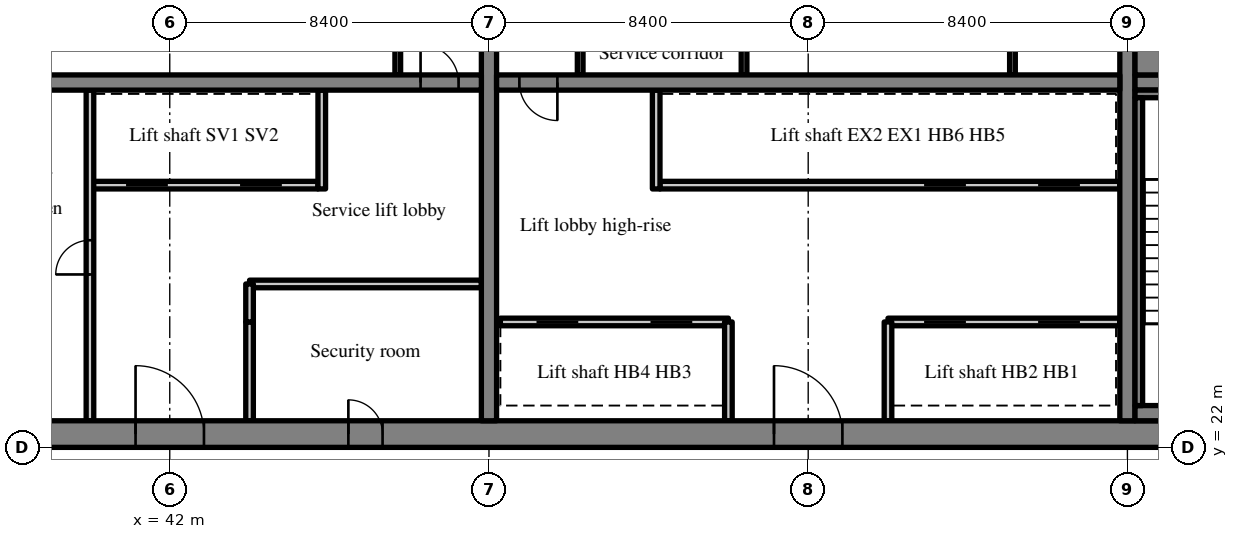
"""IFC4 building model, lengths in metres.
Left out: names, types, materials, properties, quantities, classifications, styles, units other than length and angle.
Written with IfcOpenShell. Run it as: python <this file> out.ifc"""

import sys

from ifc_helpers import new_model, si_unit, direction, frame, frame_2d, origin, place, context, subcontext, project, spatial, rectangle, extrude, source, transform, mapped, element, fill, save


model = new_model("IFC4")
c1 = context("Model", 3, precision=1e-05, world=origin(), true_north=direction((0.0, 1.0)))
c2 = subcontext(c1, "Body", "Model", "MODEL_VIEW")
j1 = project(units=[si_unit("LENGTHUNIT", "METRE"), si_unit("PLANEANGLEUNIT", "RADIAN")], contexts=[c1])
p1 = place(None, origin())
s1 = spatial("IfcSite", under=j1, at=p1, CompositionType="ELEMENT")
p2 = place(p1, origin())
s2 = spatial("IfcBuilding", under=s1, at=p2, CompositionType="ELEMENT")
p3 = place(p2, frame((0.0, 0.0, 170.6)))
s3 = spatial("IfcBuildingStorey", under=s2, at=p3, CompositionType="ELEMENT", Elevation=170.6)
m1 = source(origin(), c2, "Body", "SweptSolid", [
    extrude(rectangle(XDim=50.4, YDim=0.7, at=frame_2d((25.2, 0.0))), origin(), (0.0, 0.0, 1.0), 3.52),
])
p4 = place(p3, frame((25.2, 22.35, 0.0), z_axis=(0.0, 0.0, 1.0), x_axis=(1.0, 0.0, 0.0)))
e1 = element("IfcWall", 1, at=p4, inside=s3, PredefinedType="SHEAR", context=c2, shape_type="MappedRepresentation", body=[
    mapped(m1, transform((0.0, 0.0, 0.0), scale=1.0)),
])
m2 = source(origin(), c2, "Body", "SweptSolid", [
    extrude(rectangle(XDim=1.8, YDim=2.1, at=frame_2d((0.9, 1.05))), frame((0.0, 0.36, 0.0), z_axis=(0.0, -1.0, 0.0), x_axis=(1.0, 0.0, 0.0)), (0.0, 0.0, 1.0), 0.72),
])
p5 = place(p4, frame((15.9, 0.0, 0.0)))
e2 = element("IfcOpeningElement", 2, at=p5, cuts=e1, PredefinedType="OPENING", context=c2, shape_type="MappedRepresentation", body=[
    mapped(m2, transform((0.0, 0.0, 0.0), scale=1.0)),
])
m3 = source(origin(), c2, "Body", "SweptSolid", [
    extrude(rectangle(XDim=0.9, YDim=2.1, at=frame_2d((0.45, 1.05))), frame((0.0, 0.36, 0.0), z_axis=(0.0, -1.0, 0.0), x_axis=(1.0, 0.0, 0.0)), (0.0, 0.0, 1.0), 0.72),
])
p6 = place(p4, frame((9.7, 0.0, 0.0)))
e3 = element("IfcOpeningElement", 3, at=p6, cuts=e1, PredefinedType="OPENING", context=c2, shape_type="MappedRepresentation", body=[
    mapped(m3, transform((0.0, 0.0, 0.0), scale=1.0)),
])
p7 = place(p4, frame((21.5, 0.0, 0.0)))
e4 = element("IfcOpeningElement", 4, at=p7, cuts=e1, PredefinedType="OPENING", context=c2, shape_type="MappedRepresentation", body=[
    mapped(m3, transform((0.0, 0.0, 0.0), scale=1.0)),
])
p8 = place(p4, frame((32.7, 0.0, 0.0)))
e5 = element("IfcOpeningElement", 5, at=p8, cuts=e1, PredefinedType="OPENING", context=c2, shape_type="MappedRepresentation", body=[
    mapped(m2, transform((0.0, 0.0, 0.0), scale=1.0)),
])
m4 = source(origin(), c2, "Body", "SweptSolid", [
    extrude(rectangle(XDim=1.2, YDim=2.1, at=frame_2d((0.6, 1.05))), frame((0.0, 0.36, 0.0), z_axis=(0.0, -1.0, 0.0), x_axis=(1.0, 0.0, 0.0)), (0.0, 0.0, 1.0), 0.72),
])
p9 = place(p4, frame((6.475, 0.0, 0.0)))
e6 = element("IfcOpeningElement", 6, at=p9, cuts=e1, PredefinedType="OPENING", context=c2, shape_type="MappedRepresentation", body=[
    mapped(m4, transform((0.0, 0.0, 0.0), scale=1.0)),
])
p10 = place(p4, frame((47.875, 0.0, 0.0)))
e7 = element("IfcOpeningElement", 7, at=p10, cuts=e1, PredefinedType="OPENING", context=c2, shape_type="MappedRepresentation", body=[
    mapped(m4, transform((0.0, 0.0, 0.0), scale=1.0)),
])
m5 = source(origin(), c2, "Body", "SweptSolid", [
    extrude(rectangle(XDim=18.6, YDim=0.4, at=frame_2d((9.3, 0.0))), origin(), (0.0, 0.0, 1.0), 3.52),
])
p11 = place(p3, frame((50.4, 22.7, 0.0), z_axis=(0.0, 0.0, 1.0), x_axis=(0.0, 1.0, 0.0)))
e8 = element("IfcWall", 8, at=p11, inside=s3, PredefinedType="SHEAR", context=c2, shape_type="MappedRepresentation", body=[
    mapped(m5, transform((0.0, 0.0, 0.0), scale=1.0)),
])
m6 = source(origin(), c2, "Body", "SweptSolid", [
    extrude(rectangle(XDim=1.1, YDim=2.1, at=frame_2d((0.55, 1.05))), frame((0.0, 0.21, 0.0), z_axis=(0.0, -1.0, 0.0), x_axis=(1.0, 0.0, 0.0)), (0.0, 0.0, 1.0), 0.42),
])
p12 = place(p11, frame((12.75, 0.0, 0.0)))
e9 = element("IfcOpeningElement", 9, at=p12, cuts=e8, PredefinedType="OPENING", context=c2, shape_type="MappedRepresentation", body=[
    mapped(m6, transform((0.0, 0.0, 0.0), scale=1.0)),
])
p13 = place(p3, frame((67.2, 22.7, 0.0), z_axis=(0.0, 0.0, 1.0), x_axis=(0.0, 1.0, 0.0)))
e10 = element("IfcWall", 10, at=p13, inside=s3, PredefinedType="SHEAR", context=c2, shape_type="MappedRepresentation", body=[
    mapped(m5, transform((0.0, 0.0, 0.0), scale=1.0)),
])
m7 = source(origin(), c2, "Body", "SweptSolid", [
    extrude(rectangle(XDim=16.4, YDim=0.4, at=frame_2d((8.2, 0.0))), origin(), (0.0, 0.0, 1.0), 3.52),
])
p14 = place(p3, frame((33.8, 31.6, 0.0), z_axis=(0.0, 0.0, 1.0), x_axis=(1.0, 0.0, 0.0)))
e11 = element("IfcWall", 11, at=p14, inside=s3, PredefinedType="SHEAR", context=c2, shape_type="MappedRepresentation", body=[
    mapped(m7, transform((0.0, 0.0, 0.0), scale=1.0)),
])
m8 = source(origin(), c2, "Body", "SweptSolid", [
    extrude(rectangle(XDim=1.0, YDim=2.1, at=frame_2d((0.5, 1.05))), frame((0.0, 0.21, 0.0), z_axis=(0.0, -1.0, 0.0), x_axis=(1.0, 0.0, 0.0)), (0.0, 0.0, 1.0), 0.42),
])
p15 = place(p14, frame((14.8, 0.0, 0.0)))
e12 = element("IfcOpeningElement", 12, at=p15, cuts=e11, PredefinedType="OPENING", context=c2, shape_type="MappedRepresentation", body=[
    mapped(m8, transform((0.0, 0.0, 0.0), scale=1.0)),
])
p16 = place(p3, frame((50.6, 31.6, 0.0), z_axis=(0.0, 0.0, 1.0), x_axis=(1.0, 0.0, 0.0)))
e13 = element("IfcWall", 13, at=p16, inside=s3, PredefinedType="SHEAR", context=c2, shape_type="MappedRepresentation", body=[
    mapped(m7, transform((0.0, 0.0, 0.0), scale=1.0)),
])
p17 = place(p16, frame((0.6, 0.0, 0.0)))
e14 = element("IfcOpeningElement", 14, at=p17, cuts=e13, PredefinedType="OPENING", context=c2, shape_type="MappedRepresentation", body=[
    mapped(m8, transform((0.0, 0.0, 0.0), scale=1.0)),
])
m9 = source(origin(), c2, "Body", "SweptSolid", [
    extrude(rectangle(XDim=7.5, YDim=0.4, at=frame_2d((3.75, 0.0))), origin(), (0.0, 0.0, 1.0), 3.52),
])
p18 = place(p3, frame((67.4, 31.6, 0.0), z_axis=(0.0, 0.0, 1.0), x_axis=(1.0, 0.0, 0.0)))
e15 = element("IfcWall", 15, at=p18, inside=s3, PredefinedType="SHEAR", context=c2, shape_type="MappedRepresentation", body=[
    mapped(m9, transform((0.0, 0.0, 0.0), scale=1.0)),
])
p19 = place(p18, frame((5.725, 0.0, 0.0)))
e16 = element("IfcOpeningElement", 16, at=p19, cuts=e15, PredefinedType="OPENING", context=c2, shape_type="MappedRepresentation", body=[
    mapped(m6, transform((0.0, 0.0, 0.0), scale=1.0)),
])
m10 = source(origin(), c2, "Body", "SweptSolid", [
    extrude(rectangle(XDim=6.0, YDim=0.2, at=frame_2d((3.0, 0.0))), origin(), (0.0, 0.0, 1.0), 3.52),
])
p20 = place(p3, frame((39.9, 28.9, 0.0), z_axis=(0.0, 0.0, 1.0), x_axis=(1.0, 0.0, 0.0)))
e17 = element("IfcWall", 17, at=p20, inside=s3, PredefinedType="SOLIDWALL", context=c2, shape_type="MappedRepresentation", body=[
    mapped(m10, transform((0.0, 0.0, 0.0), scale=1.0)),
])
m11 = source(origin(), c2, "Body", "SweptSolid", [
    extrude(rectangle(XDim=1.1, YDim=2.1, at=frame_2d((0.55, 1.05))), frame((0.0, 0.11, 0.0), z_axis=(0.0, -1.0, 0.0), x_axis=(1.0, 0.0, 0.0)), (0.0, 0.0, 1.0), 0.22),
])
p21 = place(p20, frame((0.95, 0.0, 0.0)))
e18 = element("IfcOpeningElement", 18, at=p21, cuts=e17, PredefinedType="OPENING", context=c2, shape_type="MappedRepresentation", body=[
    mapped(m11, transform((0.0, 0.0, 0.0), scale=1.0)),
])
p22 = place(p20, frame((3.95, 0.0, 0.0)))
e19 = element("IfcOpeningElement", 19, at=p22, cuts=e17, PredefinedType="OPENING", context=c2, shape_type="MappedRepresentation", body=[
    mapped(m11, transform((0.0, 0.0, 0.0), scale=1.0)),
])
m12 = source(origin(), c2, "Body", "SweptSolid", [
    extrude(rectangle(XDim=8.7, YDim=0.2, at=frame_2d((4.35, 0.0))), origin(), (0.0, 0.0, 1.0), 3.52),
])
p23 = place(p3, frame((39.9, 22.7, 0.0), z_axis=(0.0, 0.0, 1.0), x_axis=(0.0, 1.0, 0.0)))
e20 = element("IfcWall", 20, at=p23, inside=s3, PredefinedType="PARTITIONING", context=c2, shape_type="MappedRepresentation", body=[
    mapped(m12, transform((0.0, 0.0, 0.0), scale=1.0)),
])
m13 = source(origin(), c2, "Body", "SweptSolid", [
    extrude(rectangle(XDim=0.9, YDim=2.1, at=frame_2d((0.45, 1.05))), frame((0.0, 0.11, 0.0), z_axis=(0.0, -1.0, 0.0), x_axis=(1.0, 0.0, 0.0)), (0.0, 0.0, 1.0), 0.22),
])
p24 = place(p23, frame((3.85, 0.0, 0.0)))
e21 = element("IfcOpeningElement", 21, at=p24, cuts=e20, PredefinedType="OPENING", context=c2, shape_type="MappedRepresentation", body=[
    mapped(m13, transform((0.0, 0.0, 0.0), scale=1.0)),
])
m14 = source(origin(), c2, "Body", "SweptSolid", [
    extrude(rectangle(XDim=2.6, YDim=0.2, at=frame_2d((1.3, 0.0))), origin(), (0.0, 0.0, 1.0), 3.52),
])
p25 = place(p3, frame((44.1, 22.7, 0.0), z_axis=(0.0, 0.0, 1.0), x_axis=(0.0, 1.0, 0.0)))
e22 = element("IfcWall", 22, at=p25, inside=s3, PredefinedType="PARTITIONING", context=c2, shape_type="MappedRepresentation", body=[
    mapped(m14, transform((0.0, 0.0, 0.0), scale=1.0)),
])
m15 = source(origin(), c2, "Body", "SweptSolid", [
    extrude(rectangle(XDim=2.6, YDim=0.2, at=frame_2d((1.3, 0.0))), origin(), (0.0, 0.0, 1.0), 3.52),
])
p26 = place(p3, frame((46.0, 28.8, 0.0), z_axis=(0.0, 0.0, 1.0), x_axis=(0.0, 1.0, 0.0)))
e23 = element("IfcWall", 23, at=p26, inside=s3, PredefinedType="SOLIDWALL", context=c2, shape_type="MappedRepresentation", body=[
    mapped(m15, transform((0.0, 0.0, 0.0), scale=1.0)),
])
m16 = source(origin(), c2, "Body", "SweptSolid", [
    extrude(rectangle(XDim=6.1, YDim=0.2, at=frame_2d((3.05, 0.0))), origin(), (0.0, 0.0, 1.0), 3.52),
])
p27 = place(p3, frame((44.1, 26.3, 0.0), z_axis=(0.0, 0.0, 1.0), x_axis=(1.0, 0.0, 0.0)))
e24 = element("IfcWall", 24, at=p27, inside=s3, PredefinedType="PARTITIONING", context=c2, shape_type="MappedRepresentation", body=[
    mapped(m16, transform((0.0, 0.0, 0.0), scale=1.0)),
])
m17 = source(origin(), c2, "Body", "SweptSolid", [
    extrude(rectangle(XDim=1.0, YDim=0.2, at=frame_2d((0.5, 0.0))), origin(), (0.0, 0.0, 1.0), 3.52),
])
p28 = place(p3, frame((44.1, 25.3, 0.0), z_axis=(0.0, 0.0, 1.0), x_axis=(0.0, 1.0, 0.0)))
e25 = element("IfcWall", 25, at=p28, inside=s3, PredefinedType="PARTITIONING", context=c2, shape_type="MappedRepresentation", body=[
    mapped(m17, transform((0.0, 0.0, 0.0), scale=1.0)),
])
m18 = source(origin(), c2, "Body", "SweptSolid", [
    extrude(rectangle(XDim=3.2, YDim=0.15, at=frame_2d((1.6, 0.0))), origin(), (0.0, 0.0, 1.0), 3.52),
])
p29 = place(p3, frame((48.0, 31.8, 0.0), z_axis=(0.0, 0.0, 1.0), x_axis=(0.0, 1.0, 0.0)))
e26 = element("IfcWall", 26, at=p29, inside=s3, PredefinedType="PARTITIONING", context=c2, shape_type="MappedRepresentation", body=[
    mapped(m18, transform((0.0, 0.0, 0.0), scale=1.0)),
])
m19 = source(origin(), c2, "Body", "SweptSolid", [
    extrude(rectangle(XDim=6.1, YDim=0.2, at=frame_2d((3.05, 0.0))), origin(), (0.0, 0.0, 1.0), 3.52),
])
p30 = place(p3, frame((67.0, 25.3, 0.0), z_axis=(0.0, 0.0, 1.0), x_axis=(-1.0, 0.0, 0.0)))
e27 = element("IfcWall", 27, at=p30, inside=s3, PredefinedType="SOLIDWALL", context=c2, shape_type="MappedRepresentation", body=[
    mapped(m19, transform((0.0, 0.0, 0.0), scale=1.0)),
])
p31 = place(p30, frame((1.05, 0.0, 0.0)))
e28 = element("IfcOpeningElement", 28, at=p31, cuts=e27, PredefinedType="OPENING", context=c2, shape_type="MappedRepresentation", body=[
    mapped(m11, transform((0.0, 0.0, 0.0), scale=1.0)),
])
p32 = place(p30, frame((4.05, 0.0, 0.0)))
e29 = element("IfcOpeningElement", 29, at=p32, cuts=e27, PredefinedType="OPENING", context=c2, shape_type="MappedRepresentation", body=[
    mapped(m11, transform((0.0, 0.0, 0.0), scale=1.0)),
])
p33 = place(p3, frame((56.7, 25.3, 0.0), z_axis=(0.0, 0.0, 1.0), x_axis=(-1.0, 0.0, 0.0)))
e30 = element("IfcWall", 30, at=p33, inside=s3, PredefinedType="SOLIDWALL", context=c2, shape_type="MappedRepresentation", body=[
    mapped(m10, transform((0.0, 0.0, 0.0), scale=1.0)),
])
p34 = place(p33, frame((0.95, 0.0, 0.0)))
e31 = element("IfcOpeningElement", 31, at=p34, cuts=e30, PredefinedType="OPENING", context=c2, shape_type="MappedRepresentation", body=[
    mapped(m11, transform((0.0, 0.0, 0.0), scale=1.0)),
])
p35 = place(p33, frame((3.95, 0.0, 0.0)))
e32 = element("IfcOpeningElement", 32, at=p35, cuts=e30, PredefinedType="OPENING", context=c2, shape_type="MappedRepresentation", body=[
    mapped(m11, transform((0.0, 0.0, 0.0), scale=1.0)),
])
m20 = source(origin(), c2, "Body", "SweptSolid", [
    extrude(rectangle(XDim=12.1, YDim=0.2, at=frame_2d((6.05, 0.0))), origin(), (0.0, 0.0, 1.0), 3.52),
])
p36 = place(p3, frame((67.0, 28.9, 0.0), z_axis=(0.0, 0.0, 1.0), x_axis=(-1.0, 0.0, 0.0)))
e33 = element("IfcWall", 33, at=p36, inside=s3, PredefinedType="SOLIDWALL", context=c2, shape_type="MappedRepresentation", body=[
    mapped(m20, transform((0.0, 0.0, 0.0), scale=1.0)),
])
p37 = place(p36, frame((1.05, 0.0, 0.0)))
e34 = element("IfcOpeningElement", 34, at=p37, cuts=e33, PredefinedType="OPENING", context=c2, shape_type="MappedRepresentation", body=[
    mapped(m11, transform((0.0, 0.0, 0.0), scale=1.0)),
])
p38 = place(p36, frame((4.05, 0.0, 0.0)))
e35 = element("IfcOpeningElement", 35, at=p38, cuts=e33, PredefinedType="OPENING", context=c2, shape_type="MappedRepresentation", body=[
    mapped(m11, transform((0.0, 0.0, 0.0), scale=1.0)),
])
for number, where, z_axis, x_axis in (
    (36, (60.9, 22.7, 0.0), (0.0, 0.0, 1.0), (0.0, 1.0, 0.0)),
    (37, (56.7, 22.7, 0.0), (0.0, 0.0, 1.0), (0.0, 1.0, 0.0)),
):
    element("IfcWall", number, at=place(p3, frame(where, z_axis=z_axis, x_axis=x_axis)), inside=s3, PredefinedType="SOLIDWALL", context=c2, shape_type="MappedRepresentation", body=[
        mapped(m14, transform((0.0, 0.0, 0.0), scale=1.0)),
    ])
p39 = place(p3, frame((54.8, 28.8, 0.0), z_axis=(0.0, 0.0, 1.0), x_axis=(0.0, 1.0, 0.0)))
e38 = element("IfcWall", 38, at=p39, inside=s3, PredefinedType="SOLIDWALL", context=c2, shape_type="MappedRepresentation", body=[
    mapped(m15, transform((0.0, 0.0, 0.0), scale=1.0)),
])
for number, where, z_axis, x_axis in (
    (39, (52.8, 31.8, 0.0), (0.0, 0.0, 1.0), (0.0, 1.0, 0.0)),
    (40, (64.175, 31.8, 0.0), (0.0, 0.0, 1.0), (0.0, 1.0, 0.0)),
    (41, (57.112, 31.8, 0.0), (0.0, 0.0, 1.0), (0.0, 1.0, 0.0)),
):
    element("IfcWall", number, at=place(p3, frame(where, z_axis=z_axis, x_axis=x_axis)), inside=s3, PredefinedType="PARTITIONING", context=c2, shape_type="MappedRepresentation", body=[
        mapped(m18, transform((0.0, 0.0, 0.0), scale=1.0)),
    ])
m21 = source(origin(), c2, "Body", "SweptSolid", [
    extrude(rectangle(XDim=4.85, YDim=0.4, at=frame_2d((2.425, 0.0))), origin(), (0.0, 0.0, 1.0), 3.52),
])
p40 = place(p3, frame((67.4, 22.9, 0.0), z_axis=(0.0, 0.0, 1.0), x_axis=(1.0, 0.0, 0.0)))
e42 = element("IfcWall", 42, at=p40, inside=s3, PredefinedType="SOLIDWALL", context=c2, shape_type="MappedRepresentation", body=[
    mapped(m21, transform((0.0, 0.0, 0.0), scale=1.0)),
])
m22 = source(origin(), c2, "Body", "SweptSolid", [
    extrude(rectangle(XDim=4.85, YDim=0.2, at=frame_2d((2.425, 0.0))), origin(), (0.0, 0.0, 1.0), 3.52),
])
p41 = place(p3, frame((67.4, 31.3, 0.0), z_axis=(0.0, 0.0, 1.0), x_axis=(1.0, 0.0, 0.0)))
e43 = element("IfcWall", 43, at=p41, inside=s3, PredefinedType="SOLIDWALL", context=c2, shape_type="MappedRepresentation", body=[
    mapped(m22, transform((0.0, 0.0, 0.0), scale=1.0)),
])
m23 = source(origin(), c2, "Body", "SweptSolid", [
    extrude(rectangle(XDim=8.1, YDim=0.2, at=frame_2d((4.05, 0.0))), origin(), (0.0, 0.0, 1.0), 3.52),
])
p42 = place(p3, frame((67.5, 23.1, 0.0), z_axis=(0.0, 0.0, 1.0), x_axis=(0.0, 1.0, 0.0)))
e44 = element("IfcWall", 44, at=p42, inside=s3, PredefinedType="SOLIDWALL", context=c2, shape_type="MappedRepresentation", body=[
    mapped(m23, transform((0.0, 0.0, 0.0), scale=1.0)),
])
m24 = source(origin(), c2, "Body", "SweptSolid", [
    extrude(rectangle(XDim=4.85, YDim=1.0, at=frame_2d((2.425, 0.0))), origin(), (0.0, 0.0, 1.0), 3.52),
])
p43 = place(p3, frame((67.4, 32.3, 0.0), z_axis=(0.0, 0.0, 1.0), x_axis=(1.0, 0.0, 0.0)))
e45 = element("IfcWall", 45, at=p43, inside=s3, PredefinedType="SOLIDWALL", context=c2, shape_type="MappedRepresentation", body=[
    mapped(m24, transform((0.0, 0.0, 0.0), scale=1.0)),
])
m25 = source(origin(), c2, "Body", "SweptSolid", [
    extrude(rectangle(XDim=1.8, YDim=2.1, at=frame_2d((0.9, 1.05))), frame((0.0, 0.275, 0.0), z_axis=(0.0, -1.0, 0.0), x_axis=(1.0, 0.0, 0.0)), (0.0, 0.0, 1.0), 0.05),
])
p44 = place(p5, origin())
e46 = element("IfcDoor", 46, at=p44, inside=s3, OperationType="DOUBLE_DOOR_SINGLE_SWING", PredefinedType="DOOR", context=c2, shape_type="MappedRepresentation", body=[
    mapped(m25, transform((0.0, 0.0, 0.0), scale=1.0)),
])
fill(e2, e46)
m26 = source(origin(), c2, "Body", "SweptSolid", [
    extrude(rectangle(XDim=1.0, YDim=2.1, at=frame_2d((0.5, 1.05))), frame((0.0, 0.025, 0.0), z_axis=(0.0, -1.0, 0.0), x_axis=(1.0, 0.0, 0.0)), (0.0, 0.0, 1.0), 0.05),
])
p45 = place(p15, origin())
e47 = element("IfcDoor", 47, at=p45, inside=s3, OperationType="SINGLE_SWING_LEFT", PredefinedType="DOOR", context=c2, shape_type="MappedRepresentation", body=[
    mapped(m26, transform((0.0, 0.0, 0.0), scale=1.0)),
])
fill(e12, e47)
m27 = source(origin(), c2, "Body", "SweptSolid", [
    extrude(rectangle(XDim=1.1, YDim=2.1, at=frame_2d((0.55, 1.05))), frame((0.0, 0.025, 0.0), z_axis=(0.0, -1.0, 0.0), x_axis=(1.0, 0.0, 0.0)), (0.0, 0.0, 1.0), 0.05),
])
p46 = place(p21, origin())
e48 = element("IfcDoor", 48, at=p46, inside=s3, OperationType="SLIDING_TO_LEFT", PredefinedType="DOOR", context=c2, shape_type="MappedRepresentation", body=[
    mapped(m27, transform((0.0, 0.0, 0.0), scale=1.0)),
])
fill(e18, e48)
p47 = place(p22, origin())
e49 = element("IfcDoor", 49, at=p47, inside=s3, OperationType="SLIDING_TO_RIGHT", PredefinedType="DOOR", context=c2, shape_type="MappedRepresentation", body=[
    mapped(m27, transform((0.0, 0.0, 0.0), scale=1.0)),
])
fill(e19, e49)
m28 = source(origin(), c2, "Body", "SweptSolid", [
    extrude(rectangle(XDim=0.9, YDim=2.1, at=frame_2d((0.45, 1.05))), frame((0.0, 0.025, 0.0), z_axis=(0.0, -1.0, 0.0), x_axis=(1.0, 0.0, 0.0)), (0.0, 0.0, 1.0), 0.05),
])
p48 = place(p24, origin())
e50 = element("IfcDoor", 50, at=p48, inside=s3, OperationType="SINGLE_SWING_LEFT", PredefinedType="DOOR", context=c2, shape_type="MappedRepresentation", body=[
    mapped(m28, transform((0.0, 0.0, 0.0), scale=1.0)),
])
fill(e21, e50)
m29 = source(origin(), c2, "Body", "SweptSolid", [
    extrude(rectangle(XDim=0.9, YDim=2.1, at=frame_2d((0.45, 1.05))), frame((0.0, 0.275, 0.0), z_axis=(0.0, -1.0, 0.0), x_axis=(1.0, 0.0, 0.0)), (0.0, 0.0, 1.0), 0.05),
])
p49 = place(p7, origin())
e51 = element("IfcDoor", 51, at=p49, inside=s3, OperationType="SINGLE_SWING_LEFT", PredefinedType="DOOR", context=c2, shape_type="MappedRepresentation", body=[
    mapped(m29, transform((0.0, 0.0, 0.0), scale=1.0)),
])
fill(e4, e51)
p50 = place(p8, origin())
e52 = element("IfcDoor", 52, at=p50, inside=s3, OperationType="DOUBLE_DOOR_SINGLE_SWING", PredefinedType="DOOR", context=c2, shape_type="MappedRepresentation", body=[
    mapped(m25, transform((0.0, 0.0, 0.0), scale=1.0)),
])
fill(e5, e52)
p51 = place(p17, origin())
e53 = element("IfcDoor", 53, at=p51, inside=s3, OperationType="SINGLE_SWING_RIGHT", PredefinedType="DOOR", context=c2, shape_type="MappedRepresentation", body=[
    mapped(m26, transform((0.0, 0.0, 0.0), scale=1.0)),
])
fill(e14, e53)
p52 = place(p31, origin())
e54 = element("IfcDoor", 54, at=p52, inside=s3, OperationType="SLIDING_TO_RIGHT", PredefinedType="DOOR", context=c2, shape_type="MappedRepresentation", body=[
    mapped(m27, transform((0.0, 0.0, 0.0), scale=1.0)),
])
fill(e28, e54)
p53 = place(p32, origin())
e55 = element("IfcDoor", 55, at=p53, inside=s3, OperationType="SLIDING_TO_LEFT", PredefinedType="DOOR", context=c2, shape_type="MappedRepresentation", body=[
    mapped(m27, transform((0.0, 0.0, 0.0), scale=1.0)),
])
fill(e29, e55)
p54 = place(p34, origin())
e56 = element("IfcDoor", 56, at=p54, inside=s3, OperationType="SLIDING_TO_RIGHT", PredefinedType="DOOR", context=c2, shape_type="MappedRepresentation", body=[
    mapped(m27, transform((0.0, 0.0, 0.0), scale=1.0)),
])
fill(e31, e56)
p55 = place(p35, origin())
e57 = element("IfcDoor", 57, at=p55, inside=s3, OperationType="SLIDING_TO_LEFT", PredefinedType="DOOR", context=c2, shape_type="MappedRepresentation", body=[
    mapped(m27, transform((0.0, 0.0, 0.0), scale=1.0)),
])
fill(e32, e57)
p56 = place(p37, origin())
e58 = element("IfcDoor", 58, at=p56, inside=s3, OperationType="SLIDING_TO_RIGHT", PredefinedType="DOOR", context=c2, shape_type="MappedRepresentation", body=[
    mapped(m27, transform((0.0, 0.0, 0.0), scale=1.0)),
])
fill(e34, e58)
p57 = place(p38, origin())
e59 = element("IfcDoor", 59, at=p57, inside=s3, OperationType="SLIDING_TO_LEFT", PredefinedType="DOOR", context=c2, shape_type="MappedRepresentation", body=[
    mapped(m27, transform((0.0, 0.0, 0.0), scale=1.0)),
])
fill(e35, e59)
save(model, sys.argv[1])
